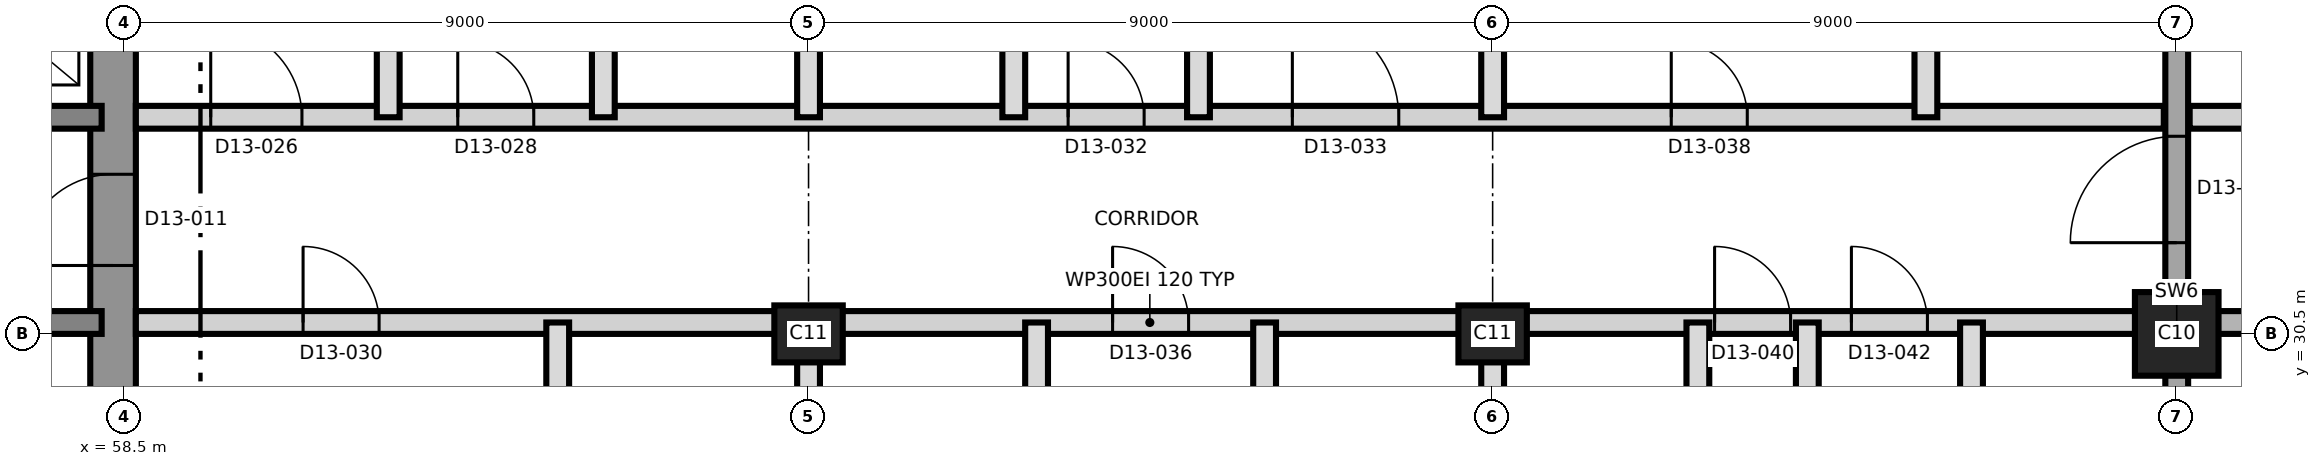
"""IFC4 building model, lengths in metres.
Left out: names, types, materials, properties, quantities, classifications, styles, units other than length and angle.
Written with IfcOpenShell. Run it as: python <this file> out.ifc"""

import sys

from ifc_helpers import new_model, si_unit, direction, frame, frame_2d, origin, origin_2d, place, context, subcontext, project, spatial, rectangle, extrude, element, fill, save


model = new_model("IFC4")
c1 = context("Model", 3, precision=1e-05, world=origin(), true_north=direction((0.0, 1.0)))
c2 = subcontext(c1, "Body", "Model", "MODEL_VIEW")
j1 = project(units=[si_unit("LENGTHUNIT", "METRE"), si_unit("PLANEANGLEUNIT", "RADIAN")], contexts=[c1])
p1 = place(None, origin())
s1 = spatial("IfcSite", under=j1, at=p1, CompositionType="ELEMENT")
p2 = place(p1, origin())
s2 = spatial("IfcBuilding", under=s1, at=p2, CompositionType="ELEMENT")
p3 = place(p2, frame((0.0, 0.0, 142.2)))
s3 = spatial("IfcBuildingStorey", under=s2, at=p3, CompositionType="ELEMENT", Elevation=142.2)
p4 = place(p3, frame((58.35, 21.2, 0.0), z_axis=(0.0, 0.0, 1.0), x_axis=(0.0, 1.0, 0.0)))
e1 = element("IfcWall", 1, at=p4, inside=s3, PredefinedType="SHEAR", context=c2, shape_type="SweptSolid", body=[
    extrude(rectangle(XDim=18.6, YDim=0.6, at=frame_2d((9.3, 0.0))), origin(), (0.0, 0.0, 1.0), 3.7),
])
p5 = place(p4, frame((10.2, 0.0, 0.0)))
e2 = element("IfcOpeningElement", 2, at=p5, cuts=e1, PredefinedType="OPENING", context=c2, shape_type="SweptSolid", body=[
    extrude(rectangle(XDim=1.2, YDim=2.1, at=frame_2d((0.6, 1.05))), frame((0.0, 0.31, 0.0), z_axis=(0.0, -1.0, 0.0), x_axis=(1.0, 0.0, 0.0)), (0.0, 0.0, 1.0), 0.62),
])
p6 = place(p3, frame((31.8, 30.65, 0.0), z_axis=(0.0, 0.0, 1.0), x_axis=(1.0, 0.0, 0.0)))
e3 = element("IfcWall", 3, at=p6, inside=s3, PredefinedType="SHEAR", context=c2, shape_type="SweptSolid", body=[
    extrude(rectangle(XDim=26.4, YDim=0.3, at=frame_2d((13.2, 0.0))), origin(), (0.0, 0.0, 1.0), 3.7),
])
p7 = place(p6, frame((24.7, 0.0, 0.0)))
e4 = element("IfcOpeningElement", 4, at=p7, cuts=e3, PredefinedType="OPENING", context=c2, shape_type="SweptSolid", body=[
    extrude(rectangle(XDim=1.0, YDim=2.1, at=frame_2d((0.5, 1.05))), frame((0.0, 0.16, 0.0), z_axis=(0.0, -1.0, 0.0), x_axis=(1.0, 0.0, 0.0)), (0.0, 0.0, 1.0), 0.32),
])
p8 = place(p6, frame((4.0, 0.0, 0.0)))
e5 = element("IfcOpeningElement", 5, at=p8, cuts=e3, PredefinedType="OPENING", context=c2, shape_type="SweptSolid", body=[
    extrude(rectangle(XDim=1.0, YDim=2.1, at=frame_2d((0.5, 1.05))), frame((0.0, 0.16, 0.0), z_axis=(0.0, -1.0, 0.0), x_axis=(1.0, 0.0, 0.0)), (0.0, 0.0, 1.0), 0.32),
])
p9 = place(p3, frame((31.8, 33.35, 0.0), z_axis=(0.0, 0.0, 1.0), x_axis=(1.0, 0.0, 0.0)))
e6 = element("IfcWall", 6, at=p9, inside=s3, PredefinedType="SHEAR", context=c2, shape_type="SweptSolid", body=[
    extrude(rectangle(XDim=26.4, YDim=0.3, at=frame_2d((13.2, 0.0))), origin(), (0.0, 0.0, 1.0), 3.7),
])
p10 = place(p9, frame((13.85, 0.0, 0.0)))
e7 = element("IfcOpeningElement", 7, at=p10, cuts=e6, PredefinedType="OPENING", context=c2, shape_type="SweptSolid", body=[
    extrude(rectangle(XDim=1.4, YDim=2.1, at=frame_2d((0.7, 1.05))), frame((0.0, 0.16, 0.0), z_axis=(0.0, -1.0, 0.0), x_axis=(1.0, 0.0, 0.0)), (0.0, 0.0, 1.0), 0.32),
])
p11 = place(p9, frame((5.325, 0.0, 0.0)))
e8 = element("IfcOpeningElement", 8, at=p11, cuts=e6, PredefinedType="OPENING", context=c2, shape_type="SweptSolid", body=[
    extrude(rectangle(XDim=1.2, YDim=2.1, at=frame_2d((0.6, 1.05))), frame((0.0, 0.16, 0.0), z_axis=(0.0, -1.0, 0.0), x_axis=(1.0, 0.0, 0.0)), (0.0, 0.0, 1.0), 0.32),
])
p12 = place(p9, frame((19.875, 0.0, 0.0)))
e9 = element("IfcOpeningElement", 9, at=p12, cuts=e6, PredefinedType="OPENING", context=c2, shape_type="SweptSolid", body=[
    extrude(rectangle(XDim=1.2, YDim=2.1, at=frame_2d((0.6, 1.05))), frame((0.0, 0.16, 0.0), z_axis=(0.0, -1.0, 0.0), x_axis=(1.0, 0.0, 0.0)), (0.0, 0.0, 1.0), 0.32),
])
for number, where, z_axis, x_axis in (
    (10, (67.5, 30.5, 0.0), (0.0, 0.0, 1.0), (1.0, 0.0, 0.0)),
    (11, (76.5, 30.5, 0.0), (0.0, 0.0, 1.0), (1.0, 0.0, 0.0)),
):
    element("IfcColumn", number, at=place(p3, frame(where, z_axis=z_axis, x_axis=x_axis)), inside=s3, PredefinedType="COLUMN", context=c2, shape_type="SweptSolid", body=[
        extrude(rectangle(XDim=0.9, YDim=0.75, at=origin_2d()), origin(), (0.0, 0.0, 1.0), 3.7),
    ])
p13 = place(p3, frame((85.5, 30.5, 0.0), z_axis=(0.0, 0.0, 1.0), x_axis=(1.0, 0.0, 0.0)))
e12 = element("IfcColumn", 12, at=p13, inside=s3, PredefinedType="COLUMN", context=c2, shape_type="SweptSolid", body=[
    extrude(rectangle(XDim=1.1, YDim=1.1, at=origin_2d()), origin(), (0.0, 0.0, 1.0), 3.7),
])
p14 = place(p3, frame((85.5, 20.35, 0.0), z_axis=(0.0, 0.0, 1.0), x_axis=(0.0, 1.0, 0.0)))
e13 = element("IfcWall", 13, at=p14, inside=s3, PredefinedType="SHEAR", context=c2, shape_type="SweptSolid", body=[
    extrude(rectangle(XDim=20.3, YDim=0.3, at=frame_2d((10.15, 0.0))), origin(), (0.0, 0.0, 1.0), 3.7),
])
p15 = place(p14, frame((11.35, 0.0, 0.0)))
e14 = element("IfcOpeningElement", 14, at=p15, cuts=e13, PredefinedType="OPENING", context=c2, shape_type="SweptSolid", body=[
    extrude(rectangle(XDim=1.4, YDim=2.1, at=frame_2d((0.7, 1.05))), frame((0.0, 0.16, 0.0), z_axis=(0.0, -1.0, 0.0), x_axis=(1.0, 0.0, 0.0)), (0.0, 0.0, 1.0), 0.32),
])
p16 = place(p3, frame((58.65, 30.65, 0.0), z_axis=(0.0, 0.0, 1.0), x_axis=(1.0, 0.0, 0.0)))
e15 = element("IfcWall", 15, at=p16, inside=s3, PredefinedType="PARTITIONING", context=c2, shape_type="SweptSolid", body=[
    extrude(rectangle(XDim=26.68, YDim=0.3, at=frame_2d((13.34, 0.0))), origin(), (0.0, 0.0, 1.0), 3.4),
])
p17 = place(p16, frame((2.2, 0.0, 0.0)))
e16 = element("IfcOpeningElement", 16, at=p17, cuts=e15, PredefinedType="OPENING", context=c2, shape_type="SweptSolid", body=[
    extrude(rectangle(XDim=1.0, YDim=2.4, at=frame_2d((0.5, 1.2))), frame((0.0, 0.16, 0.0), z_axis=(0.0, -1.0, 0.0), x_axis=(1.0, 0.0, 0.0)), (0.0, 0.0, 1.0), 0.32),
])
p18 = place(p16, frame((12.85, 0.0, 0.0)))
e17 = element("IfcOpeningElement", 17, at=p18, cuts=e15, PredefinedType="OPENING", context=c2, shape_type="SweptSolid", body=[
    extrude(rectangle(XDim=1.0, YDim=2.4, at=frame_2d((0.5, 1.2))), frame((0.0, 0.16, 0.0), z_axis=(0.0, -1.0, 0.0), x_axis=(1.0, 0.0, 0.0)), (0.0, 0.0, 1.0), 0.32),
])
p19 = place(p16, frame((20.77, 0.0, 0.0)))
e18 = element("IfcOpeningElement", 18, at=p19, cuts=e15, PredefinedType="OPENING", context=c2, shape_type="SweptSolid", body=[
    extrude(rectangle(XDim=1.0, YDim=2.1, at=frame_2d((0.5, 1.05))), frame((0.0, 0.16, 0.0), z_axis=(0.0, -1.0, 0.0), x_axis=(1.0, 0.0, 0.0)), (0.0, 0.0, 1.0), 0.32),
])
p20 = place(p16, frame((22.57, 0.0, 0.0)))
e19 = element("IfcOpeningElement", 19, at=p20, cuts=e15, PredefinedType="OPENING", context=c2, shape_type="SweptSolid", body=[
    extrude(rectangle(XDim=1.0, YDim=2.1, at=frame_2d((0.5, 1.05))), frame((0.0, 0.16, 0.0), z_axis=(0.0, -1.0, 0.0), x_axis=(1.0, 0.0, 0.0)), (0.0, 0.0, 1.0), 0.32),
])
p21 = place(p3, frame((85.67, 30.65, 0.0), z_axis=(0.0, 0.0, 1.0), x_axis=(1.0, 0.0, 0.0)))
e20 = element("IfcWall", 20, at=p21, inside=s3, PredefinedType="SHEAR", context=c2, shape_type="SweptSolid", body=[
    extrude(rectangle(XDim=9.58, YDim=0.3, at=frame_2d((4.79, 0.0))), origin(), (0.0, 0.0, 1.0), 3.4),
])
p22 = place(p21, frame((2.08, 0.0, 0.0)))
e21 = element("IfcOpeningElement", 21, at=p22, cuts=e20, PredefinedType="OPENING", context=c2, shape_type="SweptSolid", body=[
    extrude(rectangle(XDim=1.2, YDim=2.1, at=frame_2d((0.6, 1.05))), frame((0.0, 0.16, 0.0), z_axis=(0.0, -1.0, 0.0), x_axis=(1.0, 0.0, 0.0)), (0.0, 0.0, 1.0), 0.32),
])
p23 = place(p21, frame((5.63, 0.0, 0.0)))
e22 = element("IfcOpeningElement", 22, at=p23, cuts=e20, PredefinedType="OPENING", context=c2, shape_type="SweptSolid", body=[
    extrude(rectangle(XDim=1.0, YDim=2.1, at=frame_2d((0.5, 1.05))), frame((0.0, 0.16, 0.0), z_axis=(0.0, -1.0, 0.0), x_axis=(1.0, 0.0, 0.0)), (0.0, 0.0, 1.0), 0.32),
])
p24 = place(p3, frame((58.65, 33.35, 0.0), z_axis=(0.0, 0.0, 1.0), x_axis=(1.0, 0.0, 0.0)))
e23 = element("IfcWall", 23, at=p24, inside=s3, PredefinedType="PARTITIONING", context=c2, shape_type="SweptSolid", body=[
    extrude(rectangle(XDim=26.68, YDim=0.3, at=frame_2d((13.34, 0.0))), origin(), (0.0, 0.0, 1.0), 3.4),
])
p25 = place(p24, frame((0.985, 0.0, 0.0)))
e24 = element("IfcOpeningElement", 24, at=p25, cuts=e23, PredefinedType="OPENING", context=c2, shape_type="SweptSolid", body=[
    extrude(rectangle(XDim=1.2, YDim=2.1, at=frame_2d((0.6, 1.05))), frame((0.0, 0.16, 0.0), z_axis=(0.0, -1.0, 0.0), x_axis=(1.0, 0.0, 0.0)), (0.0, 0.0, 1.0), 0.32),
])
p26 = place(p24, frame((4.235, 0.0, 0.0)))
e25 = element("IfcOpeningElement", 25, at=p26, cuts=e23, PredefinedType="OPENING", context=c2, shape_type="SweptSolid", body=[
    extrude(rectangle(XDim=1.0, YDim=2.1, at=frame_2d((0.5, 1.05))), frame((0.0, 0.16, 0.0), z_axis=(0.0, -1.0, 0.0), x_axis=(1.0, 0.0, 0.0)), (0.0, 0.0, 1.0), 0.32),
])
p27 = place(p24, frame((12.265, 0.0, 0.0)))
e26 = element("IfcOpeningElement", 26, at=p27, cuts=e23, PredefinedType="OPENING", context=c2, shape_type="SweptSolid", body=[
    extrude(rectangle(XDim=1.0, YDim=2.1, at=frame_2d((0.5, 1.05))), frame((0.0, 0.16, 0.0), z_axis=(0.0, -1.0, 0.0), x_axis=(1.0, 0.0, 0.0)), (0.0, 0.0, 1.0), 0.32),
])
p28 = place(p24, frame((15.215, 0.0, 0.0)))
e27 = element("IfcOpeningElement", 27, at=p28, cuts=e23, PredefinedType="OPENING", context=c2, shape_type="SweptSolid", body=[
    extrude(rectangle(XDim=1.4, YDim=2.1, at=frame_2d((0.7, 1.05))), frame((0.0, 0.16, 0.0), z_axis=(0.0, -1.0, 0.0), x_axis=(1.0, 0.0, 0.0)), (0.0, 0.0, 1.0), 0.32),
])
p29 = place(p24, frame((20.2, 0.0, 0.0)))
e28 = element("IfcOpeningElement", 28, at=p29, cuts=e23, PredefinedType="OPENING", context=c2, shape_type="SweptSolid", body=[
    extrude(rectangle(XDim=1.0, YDim=2.4, at=frame_2d((0.5, 1.2))), frame((0.0, 0.16, 0.0), z_axis=(0.0, -1.0, 0.0), x_axis=(1.0, 0.0, 0.0)), (0.0, 0.0, 1.0), 0.32),
])
p30 = place(p3, frame((85.67, 33.35, 0.0), z_axis=(0.0, 0.0, 1.0), x_axis=(1.0, 0.0, 0.0)))
e29 = element("IfcWall", 29, at=p30, inside=s3, PredefinedType="PARTITIONING", context=c2, shape_type="SweptSolid", body=[
    extrude(rectangle(XDim=9.58, YDim=0.3, at=frame_2d((4.79, 0.0))), origin(), (0.0, 0.0, 1.0), 3.4),
])
p31 = place(p30, frame((1.83, 0.0, 0.0)))
e30 = element("IfcOpeningElement", 30, at=p31, cuts=e29, PredefinedType="OPENING", context=c2, shape_type="SweptSolid", body=[
    extrude(rectangle(XDim=1.0, YDim=2.1, at=frame_2d((0.5, 1.05))), frame((0.0, 0.16, 0.0), z_axis=(0.0, -1.0, 0.0), x_axis=(1.0, 0.0, 0.0)), (0.0, 0.0, 1.0), 0.32),
])
p32 = place(p30, frame((5.63, 0.0, 0.0)))
e31 = element("IfcOpeningElement", 31, at=p32, cuts=e29, PredefinedType="OPENING", context=c2, shape_type="SweptSolid", body=[
    extrude(rectangle(XDim=1.0, YDim=2.1, at=frame_2d((0.5, 1.05))), frame((0.0, 0.16, 0.0), z_axis=(0.0, -1.0, 0.0), x_axis=(1.0, 0.0, 0.0)), (0.0, 0.0, 1.0), 0.32),
])
p33 = place(p3, frame((61.97, 33.35, 0.0), z_axis=(0.0, 0.0, 1.0), x_axis=(0.0, 1.0, 0.0)))
e32 = element("IfcWall", 32, at=p33, inside=s3, PredefinedType="PARTITIONING", context=c2, shape_type="SweptSolid", body=[
    extrude(rectangle(XDim=7.48, YDim=0.3, at=frame_2d((3.74, 0.0))), origin(), (0.0, 0.0, 1.0), 3.4),
])
p34 = place(p3, frame((64.2, 27.15, 0.0), z_axis=(0.0, 0.0, 1.0), x_axis=(0.0, 1.0, 0.0)))
e33 = element("IfcWall", 33, at=p34, inside=s3, PredefinedType="PARTITIONING", context=c2, shape_type="SweptSolid", body=[
    extrude(rectangle(XDim=3.5, YDim=0.3, at=frame_2d((1.75, 0.0))), origin(), (0.0, 0.0, 1.0), 3.4),
])
p35 = place(p3, frame((64.8, 33.35, 0.0), z_axis=(0.0, 0.0, 1.0), x_axis=(0.0, 1.0, 0.0)))
e34 = element("IfcWall", 34, at=p35, inside=s3, PredefinedType="PARTITIONING", context=c2, shape_type="SweptSolid", body=[
    extrude(rectangle(XDim=3.2, YDim=0.3, at=frame_2d((1.6, 0.0))), origin(), (0.0, 0.0, 1.0), 3.4),
])
p36 = place(p3, frame((67.5, 20.35, 0.0), z_axis=(0.0, 0.0, 1.0), x_axis=(0.0, 1.0, 0.0)))
e35 = element("IfcWall", 35, at=p36, inside=s3, PredefinedType="PARTITIONING", context=c2, shape_type="SweptSolid", body=[
    extrude(rectangle(XDim=10.3, YDim=0.3, at=frame_2d((5.15, 0.0))), origin(), (0.0, 0.0, 1.0), 3.4),
])
p37 = place(p3, frame((67.5, 33.35, 0.0), z_axis=(0.0, 0.0, 1.0), x_axis=(0.0, 1.0, 0.0)))
e36 = element("IfcWall", 36, at=p37, inside=s3, PredefinedType="PARTITIONING", context=c2, shape_type="SweptSolid", body=[
    extrude(rectangle(XDim=7.48, YDim=0.3, at=frame_2d((3.74, 0.0))), origin(), (0.0, 0.0, 1.0), 3.4),
])
p38 = place(p3, frame((70.2, 33.35, 0.0), z_axis=(0.0, 0.0, 1.0), x_axis=(0.0, 1.0, 0.0)))
e37 = element("IfcWall", 37, at=p38, inside=s3, PredefinedType="PARTITIONING", context=c2, shape_type="SweptSolid", body=[
    extrude(rectangle(XDim=3.2, YDim=0.3, at=frame_2d((1.6, 0.0))), origin(), (0.0, 0.0, 1.0), 3.4),
])
p39 = place(p3, frame((70.5, 27.35, 0.0), z_axis=(0.0, 0.0, 1.0), x_axis=(0.0, 1.0, 0.0)))
e38 = element("IfcWall", 38, at=p39, inside=s3, PredefinedType="PARTITIONING", context=c2, shape_type="SweptSolid", body=[
    extrude(rectangle(XDim=3.3, YDim=0.3, at=frame_2d((1.65, 0.0))), origin(), (0.0, 0.0, 1.0), 3.4),
])
p40 = place(p3, frame((72.63, 33.35, 0.0), z_axis=(0.0, 0.0, 1.0), x_axis=(0.0, 1.0, 0.0)))
e39 = element("IfcWall", 39, at=p40, inside=s3, PredefinedType="PARTITIONING", context=c2, shape_type="SweptSolid", body=[
    extrude(rectangle(XDim=7.48, YDim=0.3, at=frame_2d((3.74, 0.0))), origin(), (0.0, 0.0, 1.0), 3.4),
])
p41 = place(p3, frame((73.5, 27.35, 0.0), z_axis=(0.0, 0.0, 1.0), x_axis=(0.0, 1.0, 0.0)))
e40 = element("IfcWall", 40, at=p41, inside=s3, PredefinedType="PARTITIONING", context=c2, shape_type="SweptSolid", body=[
    extrude(rectangle(XDim=3.3, YDim=0.3, at=frame_2d((1.65, 0.0))), origin(), (0.0, 0.0, 1.0), 3.4),
])
p42 = place(p3, frame((76.5, 20.35, 0.0), z_axis=(0.0, 0.0, 1.0), x_axis=(0.0, 1.0, 0.0)))
e41 = element("IfcWall", 41, at=p42, inside=s3, PredefinedType="PARTITIONING", context=c2, shape_type="SweptSolid", body=[
    extrude(rectangle(XDim=10.3, YDim=0.3, at=frame_2d((5.15, 0.0))), origin(), (0.0, 0.0, 1.0), 3.4),
])
p43 = place(p3, frame((76.5, 33.35, 0.0), z_axis=(0.0, 0.0, 1.0), x_axis=(0.0, 1.0, 0.0)))
e42 = element("IfcWall", 42, at=p43, inside=s3, PredefinedType="PARTITIONING", context=c2, shape_type="SweptSolid", body=[
    extrude(rectangle(XDim=7.48, YDim=0.3, at=frame_2d((3.74, 0.0))), origin(), (0.0, 0.0, 1.0), 3.4),
])
p44 = place(p3, frame((79.2, 27.45, 0.0), z_axis=(0.0, 0.0, 1.0), x_axis=(0.0, 1.0, 0.0)))
e43 = element("IfcWall", 43, at=p44, inside=s3, PredefinedType="PARTITIONING", context=c2, shape_type="SweptSolid", body=[
    extrude(rectangle(XDim=3.2, YDim=0.3, at=frame_2d((1.6, 0.0))), origin(), (0.0, 0.0, 1.0), 3.4),
])
p45 = place(p3, frame((80.64, 20.35, 0.0), z_axis=(0.0, 0.0, 1.0), x_axis=(0.0, 1.0, 0.0)))
e44 = element("IfcWall", 44, at=p45, inside=s3, PredefinedType="PARTITIONING", context=c2, shape_type="SweptSolid", body=[
    extrude(rectangle(XDim=10.3, YDim=0.3, at=frame_2d((5.15, 0.0))), origin(), (0.0, 0.0, 1.0), 3.4),
])
p46 = place(p3, frame((82.2, 33.35, 0.0), z_axis=(0.0, 0.0, 1.0), x_axis=(0.0, 1.0, 0.0)))
e45 = element("IfcWall", 45, at=p46, inside=s3, PredefinedType="PARTITIONING", context=c2, shape_type="SweptSolid", body=[
    extrude(rectangle(XDim=3.5, YDim=0.3, at=frame_2d((1.75, 0.0))), origin(), (0.0, 0.0, 1.0), 3.4),
])
p47 = place(p3, frame((82.8, 27.45, 0.0), z_axis=(0.0, 0.0, 1.0), x_axis=(0.0, 1.0, 0.0)))
e46 = element("IfcWall", 46, at=p47, inside=s3, PredefinedType="PARTITIONING", context=c2, shape_type="SweptSolid", body=[
    extrude(rectangle(XDim=3.2, YDim=0.3, at=frame_2d((1.6, 0.0))), origin(), (0.0, 0.0, 1.0), 3.4),
])
p48 = place(p5, origin())
e47 = element("IfcDoor", 47, at=p48, inside=s3, OperationType="SINGLE_SWING_LEFT", PredefinedType="DOOR", context=c2, shape_type="SweptSolid", body=[
    extrude(rectangle(XDim=1.2, YDim=2.1, at=frame_2d((0.6, 1.05))), frame((0.0, 0.025, 0.0), z_axis=(0.0, -1.0, 0.0), x_axis=(1.0, 0.0, 0.0)), (0.0, 0.0, 1.0), 0.05),
])
fill(e2, e47)
p49 = place(p25, origin())
e48 = element("IfcDoor", 48, at=p49, inside=s3, OperationType="SINGLE_SWING_LEFT", PredefinedType="DOOR", context=c2, shape_type="SweptSolid", body=[
    extrude(rectangle(XDim=1.2, YDim=2.1, at=frame_2d((0.6, 1.05))), frame((0.0, 0.025, 0.0), z_axis=(0.0, -1.0, 0.0), x_axis=(1.0, 0.0, 0.0)), (0.0, 0.0, 1.0), 0.05),
])
fill(e24, e48)
p50 = place(p26, origin())
e49 = element("IfcDoor", 49, at=p50, inside=s3, OperationType="SINGLE_SWING_LEFT", PredefinedType="DOOR", context=c2, shape_type="SweptSolid", body=[
    extrude(rectangle(XDim=1.0, YDim=2.1, at=frame_2d((0.5, 1.05))), frame((0.0, 0.025, 0.0), z_axis=(0.0, -1.0, 0.0), x_axis=(1.0, 0.0, 0.0)), (0.0, 0.0, 1.0), 0.05),
])
fill(e25, e49)
p51 = place(p17, origin())
e50 = element("IfcDoor", 50, at=p51, inside=s3, OperationType="SINGLE_SWING_LEFT", PredefinedType="DOOR", context=c2, shape_type="SweptSolid", body=[
    extrude(rectangle(XDim=1.0, YDim=2.4, at=frame_2d((0.5, 1.2))), frame((0.0, 0.025, 0.0), z_axis=(0.0, -1.0, 0.0), x_axis=(1.0, 0.0, 0.0)), (0.0, 0.0, 1.0), 0.05),
])
fill(e16, e50)
p52 = place(p27, origin())
e51 = element("IfcDoor", 51, at=p52, inside=s3, OperationType="SINGLE_SWING_RIGHT", PredefinedType="DOOR", context=c2, shape_type="SweptSolid", body=[
    extrude(rectangle(XDim=1.0, YDim=2.1, at=frame_2d((0.5, 1.05))), frame((0.0, 0.025, 0.0), z_axis=(0.0, -1.0, 0.0), x_axis=(1.0, 0.0, 0.0)), (0.0, 0.0, 1.0), 0.05),
])
fill(e26, e51)
p53 = place(p28, origin())
e52 = element("IfcDoor", 52, at=p53, inside=s3, OperationType="SINGLE_SWING_LEFT", PredefinedType="DOOR", context=c2, shape_type="SweptSolid", body=[
    extrude(rectangle(XDim=1.4, YDim=2.1, at=frame_2d((0.7, 1.05))), frame((0.0, 0.025, 0.0), z_axis=(0.0, -1.0, 0.0), x_axis=(1.0, 0.0, 0.0)), (0.0, 0.0, 1.0), 0.05),
])
fill(e27, e52)
p54 = place(p18, origin())
e53 = element("IfcDoor", 53, at=p54, inside=s3, OperationType="SINGLE_SWING_RIGHT", PredefinedType="DOOR", context=c2, shape_type="SweptSolid", body=[
    extrude(rectangle(XDim=1.0, YDim=2.4, at=frame_2d((0.5, 1.2))), frame((0.0, 0.025, 0.0), z_axis=(0.0, -1.0, 0.0), x_axis=(1.0, 0.0, 0.0)), (0.0, 0.0, 1.0), 0.05),
])
fill(e17, e53)
p55 = place(p29, origin())
e54 = element("IfcDoor", 54, at=p55, inside=s3, OperationType="SINGLE_SWING_RIGHT", PredefinedType="DOOR", context=c2, shape_type="SweptSolid", body=[
    extrude(rectangle(XDim=1.0, YDim=2.4, at=frame_2d((0.5, 1.2))), frame((0.0, 0.025, 0.0), z_axis=(0.0, -1.0, 0.0), x_axis=(1.0, 0.0, 0.0)), (0.0, 0.0, 1.0), 0.05),
])
fill(e28, e54)
p56 = place(p19, origin())
e55 = element("IfcDoor", 55, at=p56, inside=s3, OperationType="SINGLE_SWING_LEFT", PredefinedType="DOOR", context=c2, shape_type="SweptSolid", body=[
    extrude(rectangle(XDim=1.0, YDim=2.1, at=frame_2d((0.5, 1.05))), frame((0.0, 0.025, 0.0), z_axis=(0.0, -1.0, 0.0), x_axis=(1.0, 0.0, 0.0)), (0.0, 0.0, 1.0), 0.05),
])
fill(e18, e55)
p57 = place(p20, origin())
e56 = element("IfcDoor", 56, at=p57, inside=s3, OperationType="SINGLE_SWING_LEFT", PredefinedType="DOOR", context=c2, shape_type="SweptSolid", body=[
    extrude(rectangle(XDim=1.0, YDim=2.1, at=frame_2d((0.5, 1.05))), frame((0.0, 0.025, 0.0), z_axis=(0.0, -1.0, 0.0), x_axis=(1.0, 0.0, 0.0)), (0.0, 0.0, 1.0), 0.05),
])
fill(e19, e56)
p58 = place(p15, origin())
e57 = element("IfcDoor", 57, at=p58, inside=s3, OperationType="SINGLE_SWING_RIGHT", PredefinedType="DOOR", context=c2, shape_type="SweptSolid", body=[
    extrude(rectangle(XDim=1.4, YDim=2.1, at=frame_2d((0.7, 1.05))), frame((0.0, 0.025, 0.0), z_axis=(0.0, -1.0, 0.0), x_axis=(1.0, 0.0, 0.0)), (0.0, 0.0, 1.0), 0.05),
])
fill(e14, e57)
save(model, sys.argv[1])
